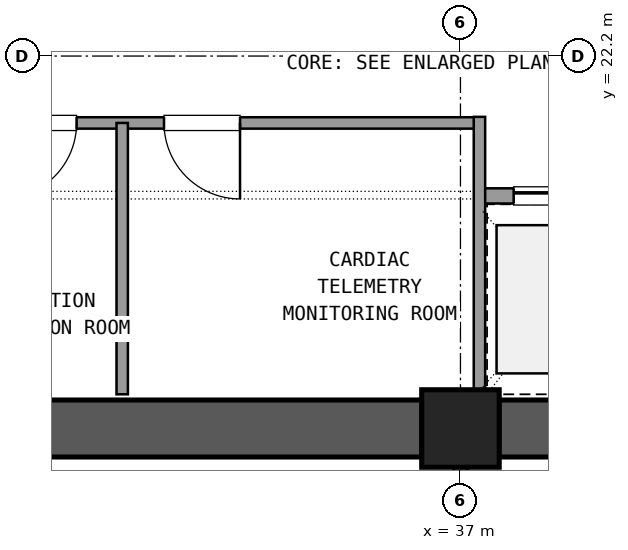
"""IFC4 building model, lengths in metres.
Left out: names, types, materials, properties, quantities, classifications, styles, units other than length and angle.
Written with IfcOpenShell. Run it as: python <this file> out.ifc"""

import sys

from ifc_helpers import new_model, si_unit, direction, frame, frame_2d, origin, origin_2d, place, context, subcontext, project, spatial, rectangle, extrude, element, fill, save


model = new_model("IFC4")
c1 = context("Model", 3, precision=1e-05, world=origin(), true_north=direction((0.0, 1.0)))
c2 = subcontext(c1, "Body", "Model", "MODEL_VIEW")
j1 = project(units=[si_unit("LENGTHUNIT", "METRE"), si_unit("PLANEANGLEUNIT", "RADIAN")], contexts=[c1])
p1 = place(None, origin())
s1 = spatial("IfcSite", under=j1, at=p1, CompositionType="ELEMENT")
p2 = place(p1, origin())
s2 = spatial("IfcBuilding", under=s1, at=p2, CompositionType="ELEMENT")
p3 = place(p2, frame((0.0, 0.0, 152.82)))
s3 = spatial("IfcBuildingStorey", under=s2, at=p3, CompositionType="ELEMENT", Elevation=152.82)
p4 = place(p3, frame((37.0, 17.3, 0.0), z_axis=(0.0, 0.0, 1.0), x_axis=(1.0, 0.0, 0.0)))
e1 = element("IfcColumn", 1, at=p4, inside=s3, PredefinedType="COLUMN", context=c2, shape_type="SweptSolid", body=[
    extrude(rectangle(XDim=1.02, YDim=1.02, at=origin_2d()), origin(), (0.0, 0.0, 1.0), 3.6),
])
for number, where, z_axis, x_axis in (
    (2, (26.305, 17.3, 0.0), (0.0, 0.0, 1.0), (1.0, 0.0, 0.0)),
    (3, (37.505, 17.3, 0.0), (0.0, 0.0, 1.0), (1.0, 0.0, 0.0)),
):
    element("IfcWall", number, at=place(p3, frame(where, z_axis=z_axis, x_axis=x_axis)), inside=s3, PredefinedType="SHEAR", context=c2, shape_type="SweptSolid", body=[
        extrude(rectangle(XDim=10.19, YDim=0.75, at=frame_2d((5.095, 0.0))), origin(), (0.0, 0.0, 1.0), 3.32),
    ])
p5 = place(p3, frame((30.25, 21.32, 0.0), z_axis=(0.0, 0.0, 1.0), x_axis=(1.0, 0.0, 0.0)))
e4 = element("IfcWall", 4, at=p5, inside=s3, PredefinedType="PARTITIONING", context=c2, shape_type="SweptSolid", body=[
    extrude(rectangle(XDim=7.0, YDim=0.15, at=frame_2d((3.5, 0.0))), origin(), (0.0, 0.0, 1.0), 2.61),
])
p6 = place(p5, frame((0.7, 0.0, 0.0)))
e5 = element("IfcOpeningElement", 5, at=p6, cuts=e4, PredefinedType="OPENING", context=c2, shape_type="SweptSolid", body=[
    extrude(rectangle(XDim=1.0, YDim=2.15, at=frame_2d((0.5, 1.075))), frame((0.0, 0.085, 0.0), z_axis=(0.0, -1.0, 0.0), x_axis=(1.0, 0.0, 0.0)), (0.0, 0.0, 1.0), 0.17),
])
p7 = place(p5, frame((2.85, 0.0, 0.0)))
e6 = element("IfcOpeningElement", 6, at=p7, cuts=e4, PredefinedType="OPENING", context=c2, shape_type="SweptSolid", body=[
    extrude(rectangle(XDim=1.0, YDim=2.15, at=frame_2d((0.5, 1.075))), frame((0.0, 0.085, 0.0), z_axis=(0.0, -1.0, 0.0), x_axis=(1.0, 0.0, 0.0)), (0.0, 0.0, 1.0), 0.17),
])
p8 = place(p3, frame((32.55, 17.75, 0.0), z_axis=(0.0, 0.0, 1.0), x_axis=(0.0, 1.0, 0.0)))
e7 = element("IfcWall", 7, at=p8, inside=s3, PredefinedType="PARTITIONING", context=c2, shape_type="SweptSolid", body=[
    extrude(rectangle(XDim=3.57, YDim=0.15, at=frame_2d((1.785, 0.0))), origin(), (0.0, 0.0, 1.0), 2.61),
])
p9 = place(p3, frame((37.25, 20.36, 0.0), z_axis=(0.0, 0.0, 1.0), x_axis=(1.0, 0.0, 0.0)))
e8 = element("IfcWall", 8, at=p9, inside=s3, PredefinedType="SOLIDWALL", context=c2, shape_type="SweptSolid", body=[
    extrude(rectangle(XDim=6.1, YDim=0.2, at=frame_2d((3.05, 0.0))), origin(), (0.0, 0.0, 1.0), 2.61),
])
p10 = place(p9, frame((0.45, 0.0, 0.0)))
e9 = element("IfcOpeningElement", 9, at=p10, cuts=e8, PredefinedType="OPENING", context=c2, shape_type="SweptSolid", body=[
    extrude(rectangle(XDim=1.1, YDim=2.15, at=frame_2d((0.55, 1.075))), frame((0.0, 0.11, 0.0), z_axis=(0.0, -1.0, 0.0), x_axis=(1.0, 0.0, 0.0)), (0.0, 0.0, 1.0), 0.22),
])
p11 = place(p9, frame((2.5, 0.0, 0.0)))
e10 = element("IfcOpeningElement", 10, at=p11, cuts=e8, PredefinedType="OPENING", context=c2, shape_type="SweptSolid", body=[
    extrude(rectangle(XDim=1.1, YDim=2.15, at=frame_2d((0.55, 1.075))), frame((0.0, 0.11, 0.0), z_axis=(0.0, -1.0, 0.0), x_axis=(1.0, 0.0, 0.0)), (0.0, 0.0, 1.0), 0.22),
])
p12 = place(p9, frame((4.55, 0.0, 0.0)))
e11 = element("IfcOpeningElement", 11, at=p12, cuts=e8, PredefinedType="OPENING", context=c2, shape_type="SweptSolid", body=[
    extrude(rectangle(XDim=1.1, YDim=2.15, at=frame_2d((0.55, 1.075))), frame((0.0, 0.11, 0.0), z_axis=(0.0, -1.0, 0.0), x_axis=(1.0, 0.0, 0.0)), (0.0, 0.0, 1.0), 0.22),
])
p13 = place(p3, frame((37.25, 17.75, 0.0), z_axis=(0.0, 0.0, 1.0), x_axis=(0.0, 1.0, 0.0)))
e12 = element("IfcWall", 12, at=p13, inside=s3, PredefinedType="PARTITIONING", context=c2, shape_type="SweptSolid", body=[
    extrude(rectangle(XDim=3.65, YDim=0.15, at=frame_2d((1.825, 0.0))), origin(), (0.0, 0.0, 1.0), 2.61),
])
p14 = place(p3, frame((37.0, 13.64, 0.0), z_axis=(0.0, 0.0, 1.0), x_axis=(0.0, 1.0, 0.0)))
e13 = element("IfcWall", 13, at=p14, inside=s3, PredefinedType="PARTITIONING", context=c2, shape_type="SweptSolid", body=[
    extrude(rectangle(XDim=3.21, YDim=0.18, at=frame_2d((1.605, 0.0))), origin(), (0.0, 0.0, 1.0), 2.61),
])
p15 = place(p14, frame((0.605, 0.0, 0.0)))
e14 = element("IfcOpeningElement", 14, at=p15, cuts=e13, PredefinedType="OPENING", context=c2, shape_type="SweptSolid", body=[
    extrude(rectangle(XDim=2.0, YDim=2.2, at=frame_2d((1.0, 1.1))), frame((0.0, 0.1, 0.0), z_axis=(0.0, -1.0, 0.0), x_axis=(1.0, 0.0, 0.0)), (0.0, 0.0, 1.0), 0.2),
])
p16 = place(p6, frame((1.0, 0.0, 0.0), z_axis=(0.0, 0.0, 1.0), x_axis=(-1.0, 0.0, 0.0)))
e15 = element("IfcDoor", 15, at=p16, inside=s3, OperationType="SINGLE_SWING_LEFT", PredefinedType="DOOR", context=c2, shape_type="SweptSolid", body=[
    extrude(rectangle(XDim=1.0, YDim=2.15, at=frame_2d((0.5, 1.075))), frame((0.0, 0.025, 0.0), z_axis=(0.0, -1.0, 0.0), x_axis=(1.0, 0.0, 0.0)), (0.0, 0.0, 1.0), 0.05),
])
fill(e5, e15)
p17 = place(p7, frame((1.0, 0.0, 0.0), z_axis=(0.0, 0.0, 1.0), x_axis=(-1.0, 0.0, 0.0)))
e16 = element("IfcDoor", 16, at=p17, inside=s3, OperationType="SINGLE_SWING_RIGHT", PredefinedType="DOOR", context=c2, shape_type="SweptSolid", body=[
    extrude(rectangle(XDim=1.0, YDim=2.15, at=frame_2d((0.5, 1.075))), frame((0.0, 0.025, 0.0), z_axis=(0.0, -1.0, 0.0), x_axis=(1.0, 0.0, 0.0)), (0.0, 0.0, 1.0), 0.05),
])
fill(e6, e16)
p18 = place(p10, origin())
e17 = element("IfcDoor", 17, at=p18, inside=s3, OperationType="SLIDING_TO_LEFT", PredefinedType="DOOR", context=c2, shape_type="SweptSolid", body=[
    extrude(rectangle(XDim=1.1, YDim=2.15, at=frame_2d((0.55, 1.075))), frame((0.0, 0.025, 0.0), z_axis=(0.0, -1.0, 0.0), x_axis=(1.0, 0.0, 0.0)), (0.0, 0.0, 1.0), 0.05),
])
fill(e9, e17)
save(model, sys.argv[1])
